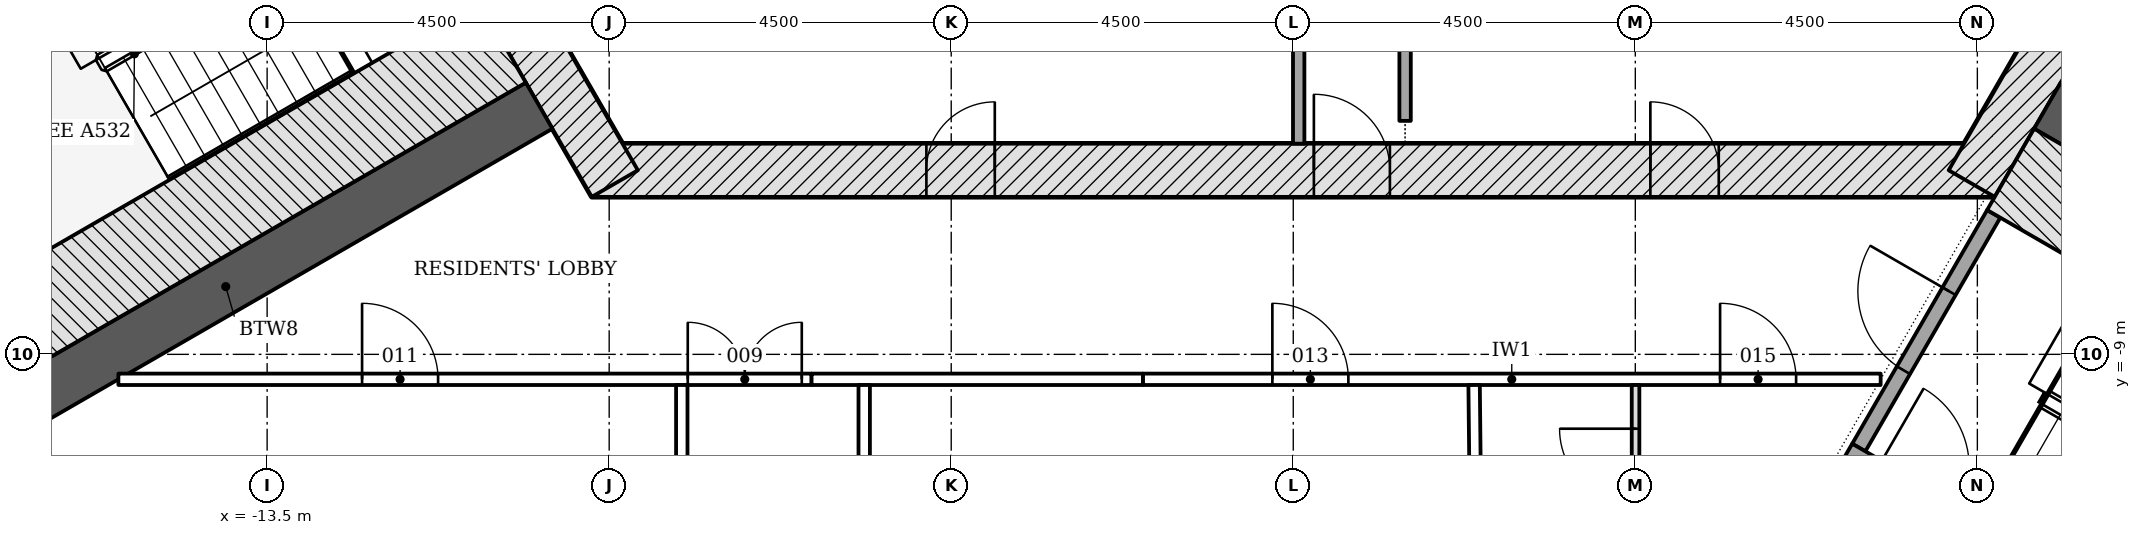
"""IFC4 building model, lengths in metres.
Left out: names, types, materials, properties, quantities, classifications, styles, units other than length and angle.
Written with IfcOpenShell. Run it as: python <this file> out.ifc"""

import sys

from ifc_helpers import new_model, si_unit, direction, frame, frame_2d, origin, place, context, subcontext, project, spatial, polyline, rectangle, outline, extrude, element, fill, save


model = new_model("IFC4")
c1 = context("Model", 3, precision=1e-05, world=origin(), true_north=direction((0.0, 1.0)))
c2 = subcontext(c1, "Body", "Model", "MODEL_VIEW")
j1 = project(units=[si_unit("LENGTHUNIT", "METRE"), si_unit("PLANEANGLEUNIT", "RADIAN")], contexts=[c1])
p1 = place(None, origin())
s1 = spatial("IfcSite", under=j1, at=p1, CompositionType="ELEMENT")
p2 = place(p1, origin())
s2 = spatial("IfcBuilding", under=s1, at=p2, CompositionType="ELEMENT")
p3 = place(p2, frame((0.0, 0.0, 185.1)))
s3 = spatial("IfcBuildingStorey", under=s2, at=p3, CompositionType="ELEMENT", Elevation=185.1)
p4 = place(p3, frame((-9.229, -6.578, -0.2), z_axis=(0.0, 0.0, 1.0), x_axis=(1.0, 0.0, 0.0)))
e1 = element("IfcWall", 1, at=p4, inside=s3, PredefinedType="SHEAR", context=c2, shape_type="SweptSolid", body=[
    extrude(rectangle(XDim=18.458, YDim=0.7, at=frame_2d((9.229, 0.0))), origin(), (0.0, 0.0, 1.0), 3.6),
])
p5 = place(p4, frame((9.5, 0.0, 0.2)))
e2 = element("IfcOpeningElement", 2, at=p5, cuts=e1, PredefinedType="OPENING", context=c2, shape_type="SweptSolid", body=[
    extrude(rectangle(XDim=1.0, YDim=2.1, at=frame_2d((0.5, 1.05))), frame((0.0, 0.36, 0.0), z_axis=(0.0, -1.0, 0.0), x_axis=(1.0, 0.0, 0.0)), (0.0, 0.0, 1.0), 0.72),
])
p6 = place(p4, frame((4.402, 0.0, 0.2)))
e3 = element("IfcOpeningElement", 3, at=p6, cuts=e1, PredefinedType="OPENING", context=c2, shape_type="SweptSolid", body=[
    extrude(rectangle(XDim=0.9, YDim=2.1, at=frame_2d((0.45, 1.05))), frame((0.0, 0.36, 0.0), z_axis=(0.0, -1.0, 0.0), x_axis=(1.0, 0.0, 0.0)), (0.0, 0.0, 1.0), 0.72),
])
p7 = place(p4, frame((13.927, 0.0, 0.2)))
e4 = element("IfcOpeningElement", 4, at=p7, cuts=e1, PredefinedType="OPENING", context=c2, shape_type="SweptSolid", body=[
    extrude(rectangle(XDim=0.9, YDim=2.1, at=frame_2d((0.45, 1.05))), frame((0.0, 0.36, 0.0), z_axis=(0.0, -1.0, 0.0), x_axis=(1.0, 0.0, 0.0)), (0.0, 0.0, 1.0), 0.72),
])
for number, where, z_axis, x_axis in (
    (5, (8.926, -6.753, -0.2), (0.0, 0.0, 1.0), (0.5, 0.866, 0.0)),
    (6, (-10.311, -4.353, -0.2), (0.0, 0.0, 1.0), (0.5, -0.866, 0.0)),
):
    element("IfcWall", number, at=place(p3, frame(where, z_axis=z_axis, x_axis=x_axis)), inside=s3, PredefinedType="SHEAR", context=c2, shape_type="SweptSolid", body=[
        extrude(rectangle(XDim=2.771, YDim=0.7, at=frame_2d((1.386, 0.0))), origin(), (0.0, 0.0, 1.0), 3.6),
    ])
for number, where, z_axis, x_axis in (
    (7, (-9.922, -5.728, -0.2), (0.0, 0.0, 1.0), (-0.866, -0.5, 0.0)),
    (8, (9.922, -5.728, -0.2), (0.0, 0.0, 1.0), (0.866, -0.5, 0.0)),
):
    element("IfcWall", number, at=place(p3, frame(where, z_axis=z_axis, x_axis=x_axis)), inside=s3, PredefinedType="SHEAR", context=c2, shape_type="SweptSolid", body=[
        extrude(rectangle(XDim=9.521, YDim=0.7, at=frame_2d((4.761, 0.0))), origin(), (0.0, 0.0, 1.0), 3.6),
    ])
p8 = place(p3, origin())
e9 = element("IfcWall", 9, at=p8, inside=s3, PredefinedType="NOTDEFINED", context=c2, shape_type="SweptSolid", body=[
    extrude(outline(polyline([(-21.229, -5.913), (-21.865, -7.243), (-22.33, -8.73), (-22.374, -10.287), (-21.992, -11.798), (-21.213, -13.147), (-20.096, -14.233), (-18.726, -14.974), (-17.205, -15.313), (-15.735, -15.429), (-15.712, -15.13), (-17.16, -15.016), (-18.619, -14.69), (-19.917, -13.989), (-20.974, -12.961), (-21.711, -11.684), (-22.073, -10.254), (-22.032, -8.78), (-21.584, -7.353), (-20.959, -6.042), (-21.229, -5.913)])), origin(), (0.0, 0.0, 1.0), 3.3),
])
p9 = place(p3, frame((0.071, 4.272, 0.0), z_axis=(0.0, 0.0, 1.0), x_axis=(0.0, -1.0, 0.0)))
e10 = element("IfcWall", 10, at=p9, inside=s3, PredefinedType="PARTITIONING", context=c2, shape_type="SweptSolid", body=[
    extrude(rectangle(XDim=10.5, YDim=0.15, at=frame_2d((5.25, 0.0))), origin(), (0.0, 0.0, 1.0), 3.4),
])
p10 = place(p9, frame((3.101, 0.0, 0.0)))
e11 = element("IfcOpeningElement", 11, at=p10, cuts=e10, PredefinedType="OPENING", context=c2, shape_type="SweptSolid", body=[
    extrude(rectangle(XDim=0.9, YDim=2.1, at=frame_2d((0.45, 1.05))), frame((0.0, 0.085, 0.0), z_axis=(0.0, -1.0, 0.0), x_axis=(1.0, 0.0, 0.0)), (0.0, 0.0, 1.0), 0.17),
])
p11 = place(p3, frame((1.471, -5.928, 0.0), z_axis=(0.0, 0.0, 1.0), x_axis=(0.0, 1.0, 0.0)))
e12 = element("IfcWall", 12, at=p11, inside=s3, PredefinedType="PARTITIONING", context=c2, shape_type="SweptSolid", body=[
    extrude(rectangle(XDim=10.206, YDim=0.15, at=frame_2d((5.103, 0.0))), origin(), (0.0, 0.0, 1.0), 3.4),
])
p12 = place(p11, frame((6.15, 0.0, 0.0)))
e13 = element("IfcOpeningElement", 13, at=p12, cuts=e12, PredefinedType="OPENING", context=c2, shape_type="SweptSolid", body=[
    extrude(rectangle(XDim=1.0, YDim=2.1, at=frame_2d((0.5, 1.05))), frame((0.0, 0.085, 0.0), z_axis=(0.0, -1.0, 0.0), x_axis=(1.0, 0.0, 0.0)), (0.0, 0.0, 1.0), 0.17),
])
p13 = place(p3, frame((-10.406, -4.89, -0.2), z_axis=(0.0, 0.0, 1.0), x_axis=(-0.866018442252, -0.500012057535, 0.0)))
e14 = element("IfcWall", 14, at=p13, inside=s3, PredefinedType="SHEAR", context=c2, shape_type="SweptSolid", body=[
    extrude(rectangle(XDim=7.2, YDim=1.236, at=frame_2d((3.6, 0.0))), origin(), (0.0, 0.0, 1.0), 3.6),
])
p14 = place(p3, frame((7.44, -10.226, -0.2), z_axis=(0.0, 0.0, 1.0), x_axis=(0.500022077904, 0.866012656725, 0.0)))
e15 = element("IfcWall", 15, at=p14, inside=s3, PredefinedType="SHEAR", context=c2, shape_type="SweptSolid", body=[
    extrude(rectangle(XDim=3.55, YDim=0.2, at=frame_2d((1.775, 0.0))), origin(), (0.0, 0.0, 1.0), 3.6),
])
p15 = place(p14, frame((1.175, 0.0, 0.2)))
e16 = element("IfcOpeningElement", 16, at=p15, cuts=e15, PredefinedType="OPENING", context=c2, shape_type="SweptSolid", body=[
    extrude(rectangle(XDim=1.2, YDim=2.1, at=frame_2d((0.6, 1.05))), frame((0.0, 0.11, 0.0), z_axis=(0.0, -1.0, 0.0), x_axis=(1.0, 0.0, 0.0)), (0.0, 0.0, 1.0), 0.22),
])
p16 = place(p3, frame((7.304, -10.262, -0.2), z_axis=(0.0, 0.0, 1.0), x_axis=(0.866026594901, -0.49999793692, 0.0)))
e17 = element("IfcWall", 17, at=p16, inside=s3, PredefinedType="SHEAR", context=c2, shape_type="SweptSolid", body=[
    extrude(rectangle(XDim=5.6, YDim=0.2, at=frame_2d((2.8, 0.0))), origin(), (0.0, 0.0, 1.0), 3.6),
])
p17 = place(p16, frame((0.45, 0.0, 0.2)))
e18 = element("IfcOpeningElement", 18, at=p17, cuts=e17, PredefinedType="OPENING", context=c2, shape_type="SweptSolid", body=[
    extrude(rectangle(XDim=1.2, YDim=2.1, at=frame_2d((0.6, 1.05))), frame((0.0, 0.11, 0.0), z_axis=(0.0, -1.0, 0.0), x_axis=(1.0, 0.0, 0.0)), (0.0, 0.0, 1.0), 0.22),
])
p18 = place(p3, frame((9.438, -6.566, -0.2), z_axis=(0.0, 0.0, 1.0), x_axis=(0.866026919366, -0.499997374926, 0.0)))
e19 = element("IfcWall", 19, at=p18, inside=s3, PredefinedType="SHEAR", context=c2, shape_type="SweptSolid", body=[
    extrude(rectangle(XDim=7.2, YDim=1.236, at=frame_2d((3.6, 0.0))), origin(), (0.0, 0.0, 1.0), 3.6),
])
p19 = place(p3, frame((-15.457, -9.328, 0.0), z_axis=(0.0, 0.0, 1.0), x_axis=(1.0, 0.0, 0.0)))
e20 = element("IfcWall", 20, at=p19, inside=s3, PredefinedType="PARTITIONING", context=c2, shape_type="SweptSolid", body=[
    extrude(rectangle(XDim=9.12, YDim=0.15, at=frame_2d((4.56, 0.0))), origin(), (0.0, 0.0, 1.0), 2.847),
])
p20 = place(p19, frame((7.491, 0.0, 0.0)))
e21 = element("IfcOpeningElement", 21, at=p20, cuts=e20, PredefinedType="OPENING", context=c2, shape_type="SweptSolid", body=[
    extrude(rectangle(XDim=1.5, YDim=2.1, at=frame_2d((0.75, 1.05))), frame((0.0, 0.085, 0.0), z_axis=(0.0, -1.0, 0.0), x_axis=(1.0, 0.0, 0.0)), (0.0, 0.0, 1.0), 0.17),
])
p21 = place(p19, frame((3.206, 0.0, 0.0)))
e22 = element("IfcOpeningElement", 22, at=p21, cuts=e20, PredefinedType="OPENING", context=c2, shape_type="SweptSolid", body=[
    extrude(rectangle(XDim=1.0, YDim=2.1, at=frame_2d((0.5, 1.05))), frame((0.0, 0.085, 0.0), z_axis=(0.0, -1.0, 0.0), x_axis=(1.0, 0.0, 0.0)), (0.0, 0.0, 1.0), 0.17),
])
p22 = place(p3, frame((-1.979, -9.328, 0.0), z_axis=(0.0, 0.0, 1.0), x_axis=(1.0, 0.0, 0.0)))
e23 = element("IfcWall", 23, at=p22, inside=s3, PredefinedType="PARTITIONING", context=c2, shape_type="SweptSolid", body=[
    extrude(rectangle(XDim=9.706, YDim=0.15, at=frame_2d((4.853, 0.0))), origin(), (0.0, 0.0, 1.0), 2.847),
])
p23 = place(p22, frame((1.703, 0.0, 0.0)))
e24 = element("IfcOpeningElement", 24, at=p23, cuts=e23, PredefinedType="OPENING", context=c2, shape_type="SweptSolid", body=[
    extrude(rectangle(XDim=1.0, YDim=2.1, at=frame_2d((0.5, 1.05))), frame((0.0, 0.085, 0.0), z_axis=(0.0, -1.0, 0.0), x_axis=(1.0, 0.0, 0.0)), (0.0, 0.0, 1.0), 0.17),
])
p24 = place(p22, frame((7.594, 0.0, 0.0)))
e25 = element("IfcOpeningElement", 25, at=p24, cuts=e23, PredefinedType="OPENING", context=c2, shape_type="SweptSolid", body=[
    extrude(rectangle(XDim=1.0, YDim=2.1, at=frame_2d((0.5, 1.05))), frame((0.0, 0.085, 0.0), z_axis=(0.0, -1.0, 0.0), x_axis=(1.0, 0.0, 0.0)), (0.0, 0.0, 1.0), 0.17),
])
p25 = place(p3, frame((-6.337, -9.328, 0.0), z_axis=(0.0, 0.0, 1.0), x_axis=(1.0, 0.0, 0.0)))
e26 = element("IfcWall", 26, at=p25, inside=s3, PredefinedType="PARTITIONING", context=c2, shape_type="SweptSolid", body=[
    extrude(rectangle(XDim=4.359, YDim=0.15, at=frame_2d((2.179, 0.0))), origin(), (0.0, 0.0, 1.0), 2.847),
])
p26 = place(p3, frame((2.442, -15.302, 0.0), z_axis=(0.0, 0.0, 1.0), x_axis=(-0.01067687349, 0.999943000562, 0.0)))
e27 = element("IfcWall", 27, at=p26, inside=s3, PredefinedType="PARTITIONING", context=c2, shape_type="SweptSolid", body=[
    extrude(rectangle(XDim=5.899, YDim=0.15, at=frame_2d((2.95, 0.0))), origin(), (0.0, 0.0, 1.0), 3.4),
])
for number, where, z_axis, x_axis in (
    (28, (-8.045, -9.403, 0.0), (0.0, 0.0, 1.0), (0.0, -1.0, 0.0)),
    (29, (-5.645, -9.403, 0.0), (0.0, 0.0, 1.0), (0.0, -1.0, 0.0)),
):
    element("IfcWall", number, at=place(p3, frame(where, z_axis=z_axis, x_axis=x_axis)), inside=s3, PredefinedType="PARTITIONING", context=c2, shape_type="SweptSolid", body=[
        extrude(rectangle(XDim=3.825, YDim=0.15, at=frame_2d((1.913, 0.0))), origin(), (0.0, 0.0, 1.0), 3.4),
    ])
p27 = place(p3, frame((4.503, -11.578, 0.0), z_axis=(0.0, 0.0, 1.0), x_axis=(0.0, 1.0, 0.0)))
e30 = element("IfcWall", 30, at=p27, inside=s3, PredefinedType="PARTITIONING", context=c2, shape_type="SweptSolid", body=[
    extrude(rectangle(XDim=2.175, YDim=0.1, at=frame_2d((1.087, 0.0))), origin(), (0.0, 0.0, 1.0), 3.4),
])
p28 = place(p27, frame((0.6, 0.0, 0.0)))
e31 = element("IfcOpeningElement", 31, at=p28, cuts=e30, PredefinedType="OPENING", context=c2, shape_type="SweptSolid", body=[
    extrude(rectangle(XDim=1.0, YDim=2.1, at=frame_2d((0.5, 1.05))), frame((0.0, 0.06, 0.0), z_axis=(0.0, -1.0, 0.0), x_axis=(1.0, 0.0, 0.0)), (0.0, 0.0, 1.0), 0.12),
])
p29 = place(p5, origin())
e32 = element("IfcDoor", 32, at=p29, inside=s3, OperationType="SINGLE_SWING_LEFT", PredefinedType="DOOR", context=c2, shape_type="SweptSolid", body=[
    extrude(rectangle(XDim=1.0, YDim=2.1, at=frame_2d((0.5, 1.05))), frame((0.0, 0.075, 0.0), z_axis=(0.0, -1.0, 0.0), x_axis=(1.0, 0.0, 0.0)), (0.0, 0.0, 1.0), 0.15),
])
fill(e2, e32)
p30 = place(p6, origin())
e33 = element("IfcDoor", 33, at=p30, inside=s3, OperationType="SINGLE_SWING_RIGHT", PredefinedType="DOOR", context=c2, shape_type="SweptSolid", body=[
    extrude(rectangle(XDim=0.9, YDim=2.1, at=frame_2d((0.45, 1.05))), frame((0.0, 0.075, 0.0), z_axis=(0.0, -1.0, 0.0), x_axis=(1.0, 0.0, 0.0)), (0.0, 0.0, 1.0), 0.15),
])
fill(e3, e33)
p31 = place(p7, origin())
e34 = element("IfcDoor", 34, at=p31, inside=s3, OperationType="SINGLE_SWING_LEFT", PredefinedType="DOOR", context=c2, shape_type="SweptSolid", body=[
    extrude(rectangle(XDim=0.9, YDim=2.1, at=frame_2d((0.45, 1.05))), frame((0.0, 0.075, 0.0), z_axis=(0.0, -1.0, 0.0), x_axis=(1.0, 0.0, 0.0)), (0.0, 0.0, 1.0), 0.15),
])
fill(e4, e34)
p32 = place(p15, origin())
e35 = element("IfcDoor", 35, at=p32, inside=s3, OperationType="SINGLE_SWING_RIGHT", PredefinedType="DOOR", context=c2, shape_type="SweptSolid", body=[
    extrude(rectangle(XDim=1.2, YDim=2.1, at=frame_2d((0.6, 1.05))), frame((0.0, 0.025, 0.0), z_axis=(0.0, -1.0, 0.0), x_axis=(1.0, 0.0, 0.0)), (0.0, 0.0, 1.0), 0.05),
])
fill(e16, e35)
p33 = place(p20, origin())
e36 = element("IfcDoor", 36, at=p33, inside=s3, OperationType="DOUBLE_DOOR_SINGLE_SWING", PredefinedType="DOOR", context=c2, shape_type="SweptSolid", body=[
    extrude(rectangle(XDim=1.5, YDim=2.1, at=frame_2d((0.75, 1.05))), frame((0.0, 0.025, 0.0), z_axis=(0.0, -1.0, 0.0), x_axis=(1.0, 0.0, 0.0)), (0.0, 0.0, 1.0), 0.05),
])
fill(e21, e36)
p34 = place(p21, origin())
e37 = element("IfcDoor", 37, at=p34, inside=s3, OperationType="SINGLE_SWING_LEFT", PredefinedType="DOOR", context=c2, shape_type="SweptSolid", body=[
    extrude(rectangle(XDim=1.0, YDim=2.1, at=frame_2d((0.5, 1.05))), frame((0.0, 0.025, 0.0), z_axis=(0.0, -1.0, 0.0), x_axis=(1.0, 0.0, 0.0)), (0.0, 0.0, 1.0), 0.05),
])
fill(e22, e37)
p35 = place(p23, origin())
e38 = element("IfcDoor", 38, at=p35, inside=s3, OperationType="SINGLE_SWING_LEFT", PredefinedType="DOOR", context=c2, shape_type="SweptSolid", body=[
    extrude(rectangle(XDim=1.0, YDim=2.1, at=frame_2d((0.5, 1.05))), frame((0.0, 0.025, 0.0), z_axis=(0.0, -1.0, 0.0), x_axis=(1.0, 0.0, 0.0)), (0.0, 0.0, 1.0), 0.05),
])
fill(e24, e38)
p36 = place(p28, origin())
e39 = element("IfcDoor", 39, at=p36, inside=s3, OperationType="SINGLE_SWING_RIGHT", PredefinedType="DOOR", context=c2, shape_type="SweptSolid", body=[
    extrude(rectangle(XDim=1.0, YDim=2.1, at=frame_2d((0.5, 1.05))), frame((0.0, 0.025, 0.0), z_axis=(0.0, -1.0, 0.0), x_axis=(1.0, 0.0, 0.0)), (0.0, 0.0, 1.0), 0.05),
])
fill(e31, e39)
p37 = place(p24, origin())
e40 = element("IfcDoor", 40, at=p37, inside=s3, OperationType="SINGLE_SWING_LEFT", PredefinedType="DOOR", context=c2, shape_type="SweptSolid", body=[
    extrude(rectangle(XDim=1.0, YDim=2.1, at=frame_2d((0.5, 1.05))), frame((0.0, 0.025, 0.0), z_axis=(0.0, -1.0, 0.0), x_axis=(1.0, 0.0, 0.0)), (0.0, 0.0, 1.0), 0.05),
])
fill(e25, e40)
save(model, sys.argv[1])
